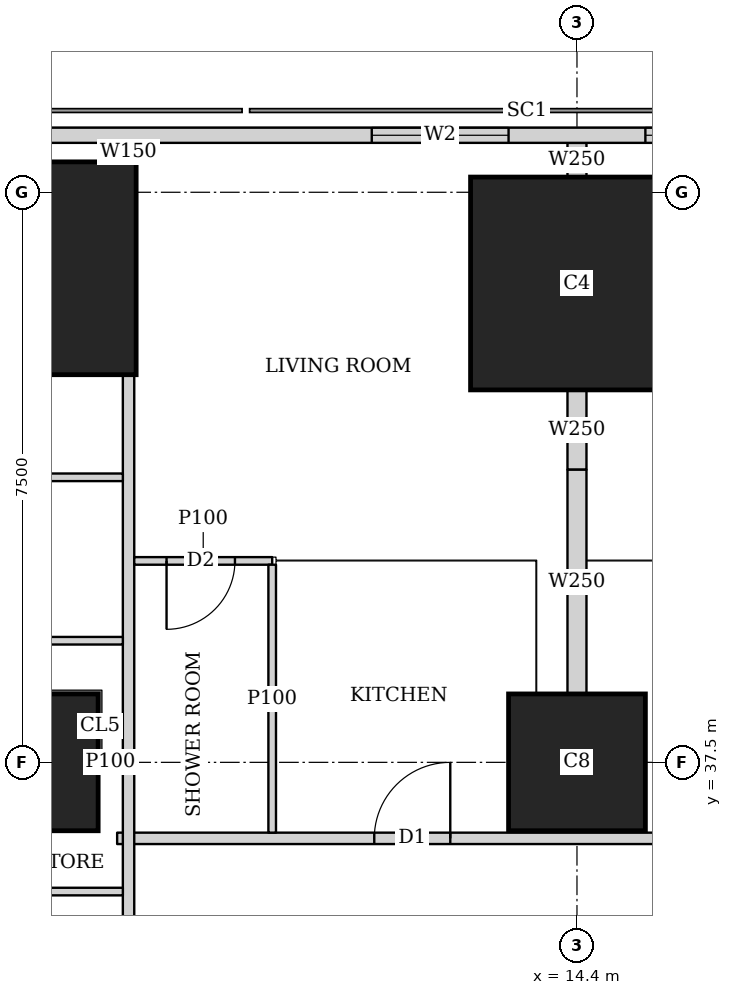
"""IFC4 building model, lengths in metres.
Left out: names, types, materials, properties, quantities, classifications, styles, units other than length and angle.
Written with IfcOpenShell. Run it as: python <this file> out.ifc"""

import sys

from ifc_helpers import new_model, si_unit, direction, frame, frame_2d, origin, origin_2d, place, context, subcontext, project, spatial, rectangle, extrude, element, fill, save


model = new_model("IFC4")
c1 = context("Model", 3, precision=1e-05, world=origin(), true_north=direction((0.0, 1.0)))
c2 = subcontext(c1, "Body", "Model", "MODEL_VIEW")
j1 = project(units=[si_unit("LENGTHUNIT", "METRE"), si_unit("PLANEANGLEUNIT", "RADIAN")], contexts=[c1])
p1 = place(None, origin())
s1 = spatial("IfcSite", under=j1, at=p1, CompositionType="ELEMENT")
p2 = place(p1, origin())
s2 = spatial("IfcBuilding", under=s1, at=p2, CompositionType="ELEMENT")
p3 = place(p2, frame((0.0, 0.0, 42.5)))
s3 = spatial("IfcBuildingStorey", under=s2, at=p3, CompositionType="ELEMENT", Elevation=42.5)
for number, where, z_axis, x_axis in (
    (1, (7.2, 37.5, 0.0), (0.0, 0.0, 1.0), (1.0, 0.0, 0.0)),
    (2, (14.4, 37.5, 0.0), (0.0, 0.0, 1.0), (1.0, 0.0, 0.0)),
):
    element("IfcColumn", number, at=place(p3, frame(where, z_axis=z_axis, x_axis=x_axis)), inside=s3, PredefinedType="COLUMN", context=c2, shape_type="SweptSolid", body=[
        extrude(rectangle(XDim=1.8, YDim=1.8, at=origin_2d()), origin(), (0.0, 0.0, 1.0), 3.75),
    ])
for number, where, z_axis, x_axis in (
    (3, (7.2, 44.0, 0.0), (0.0, 0.0, 1.0), (1.0, 0.0, 0.0)),
    (4, (14.4, 43.8, 0.0), (0.0, 0.0, 1.0), (1.0, 0.0, 0.0)),
):
    element("IfcColumn", number, at=place(p3, frame(where, z_axis=z_axis, x_axis=x_axis)), inside=s3, PredefinedType="COLUMN", context=c2, shape_type="SweptSolid", body=[
        extrude(rectangle(XDim=2.8, YDim=2.8, at=origin_2d()), origin(), (0.0, 0.0, 1.0), 3.75),
    ])
p4 = place(p3, frame((40.106, 45.75, 0.0), z_axis=(0.0, 0.0, 1.0), x_axis=(-1.0, 0.0, 0.0)))
e5 = element("IfcWall", 5, at=p4, inside=s3, PredefinedType="SOLIDWALL", context=c2, shape_type="SweptSolid", body=[
    extrude(rectangle(XDim=37.943, YDim=0.2, at=frame_2d((18.971, 0.0))), origin(), (0.0, 0.0, 1.0), 3.5),
])
p5 = place(p4, frame((8.606, 0.0, 0.9)))
e6 = element("IfcOpeningElement", 6, at=p5, cuts=e5, PredefinedType="OPENING", context=c2, shape_type="SweptSolid", body=[
    extrude(rectangle(XDim=1.8, YDim=1.5, at=frame_2d((0.9, 0.75))), frame((0.0, 0.11, 0.0), z_axis=(0.0, -1.0, 0.0), x_axis=(1.0, 0.0, 0.0)), (0.0, 0.0, 1.0), 0.22),
])
p6 = place(p4, frame((12.206, 0.0, 0.9)))
e7 = element("IfcOpeningElement", 7, at=p6, cuts=e5, PredefinedType="OPENING", context=c2, shape_type="SweptSolid", body=[
    extrude(rectangle(XDim=1.8, YDim=1.5, at=frame_2d((0.9, 0.75))), frame((0.0, 0.11, 0.0), z_axis=(0.0, -1.0, 0.0), x_axis=(1.0, 0.0, 0.0)), (0.0, 0.0, 1.0), 0.22),
])
p7 = place(p4, frame((15.806, 0.0, 0.9)))
e8 = element("IfcOpeningElement", 8, at=p7, cuts=e5, PredefinedType="OPENING", context=c2, shape_type="SweptSolid", body=[
    extrude(rectangle(XDim=1.8, YDim=1.5, at=frame_2d((0.9, 0.75))), frame((0.0, 0.11, 0.0), z_axis=(0.0, -1.0, 0.0), x_axis=(1.0, 0.0, 0.0)), (0.0, 0.0, 1.0), 0.22),
])
p8 = place(p4, frame((19.406, 0.0, 0.9)))
e9 = element("IfcOpeningElement", 9, at=p8, cuts=e5, PredefinedType="OPENING", context=c2, shape_type="SweptSolid", body=[
    extrude(rectangle(XDim=1.8, YDim=1.5, at=frame_2d((0.9, 0.75))), frame((0.0, 0.11, 0.0), z_axis=(0.0, -1.0, 0.0), x_axis=(1.0, 0.0, 0.0)), (0.0, 0.0, 1.0), 0.22),
])
p9 = place(p4, frame((23.006, 0.0, 0.9)))
e10 = element("IfcOpeningElement", 10, at=p9, cuts=e5, PredefinedType="OPENING", context=c2, shape_type="SweptSolid", body=[
    extrude(rectangle(XDim=1.8, YDim=1.5, at=frame_2d((0.9, 0.75))), frame((0.0, 0.11, 0.0), z_axis=(0.0, -1.0, 0.0), x_axis=(1.0, 0.0, 0.0)), (0.0, 0.0, 1.0), 0.22),
])
p10 = place(p4, frame((26.606, 0.0, 0.9)))
e11 = element("IfcOpeningElement", 11, at=p10, cuts=e5, PredefinedType="OPENING", context=c2, shape_type="SweptSolid", body=[
    extrude(rectangle(XDim=1.8, YDim=1.5, at=frame_2d((0.9, 0.75))), frame((0.0, 0.11, 0.0), z_axis=(0.0, -1.0, 0.0), x_axis=(1.0, 0.0, 0.0)), (0.0, 0.0, 1.0), 0.22),
])
p11 = place(p3, frame((8.5, 2.426, 0.0), z_axis=(0.0, 0.0, 1.0), x_axis=(0.0, 1.0, 0.0)))
e12 = element("IfcWall", 12, at=p11, inside=s3, PredefinedType="SOLIDWALL", context=c2, shape_type="SweptSolid", body=[
    extrude(rectangle(XDim=40.173, YDim=0.15, at=frame_2d((20.086, 0.0))), origin(), (0.0, 0.0, 1.0), 3.5),
])
p12 = place(p11, frame((9.986, 0.0, 0.0)))
e13 = element("IfcOpeningElement", 13, at=p12, cuts=e12, PredefinedType="OPENING", context=c2, shape_type="SweptSolid", body=[
    extrude(rectangle(XDim=1.0, YDim=2.1, at=frame_2d((0.5, 1.05))), frame((0.0, 0.085, 0.0), z_axis=(0.0, -1.0, 0.0), x_axis=(1.0, 0.0, 0.0)), (0.0, 0.0, 1.0), 0.17),
])
p13 = place(p11, frame((14.161, 0.0, 0.0)))
e14 = element("IfcOpeningElement", 14, at=p13, cuts=e12, PredefinedType="OPENING", context=c2, shape_type="SweptSolid", body=[
    extrude(rectangle(XDim=1.0, YDim=2.1, at=frame_2d((0.5, 1.05))), frame((0.0, 0.085, 0.0), z_axis=(0.0, -1.0, 0.0), x_axis=(1.0, 0.0, 0.0)), (0.0, 0.0, 1.0), 0.17),
])
p14 = place(p11, frame((21.662, 0.0, 0.0)))
e15 = element("IfcOpeningElement", 15, at=p14, cuts=e12, PredefinedType="OPENING", context=c2, shape_type="SweptSolid", body=[
    extrude(rectangle(XDim=1.0, YDim=2.1, at=frame_2d((0.5, 1.05))), frame((0.0, 0.085, 0.0), z_axis=(0.0, -1.0, 0.0), x_axis=(1.0, 0.0, 0.0)), (0.0, 0.0, 1.0), 0.17),
])
p15 = place(p11, frame((29.161, 0.0, 0.0)))
e16 = element("IfcOpeningElement", 16, at=p15, cuts=e12, PredefinedType="OPENING", context=c2, shape_type="SweptSolid", body=[
    extrude(rectangle(XDim=1.0, YDim=2.1, at=frame_2d((0.5, 1.05))), frame((0.0, 0.085, 0.0), z_axis=(0.0, -1.0, 0.0), x_axis=(1.0, 0.0, 0.0)), (0.0, 0.0, 1.0), 0.17),
])
p16 = place(p3, frame((8.5, 45.401, 0.0), z_axis=(0.0, 0.0, 1.0), x_axis=(0.0, 1.0, 0.0)))
e17 = element("IfcWall", 17, at=p16, inside=s3, PredefinedType="SOLIDWALL", context=c2, shape_type="SweptSolid", body=[
    extrude(rectangle(XDim=0.249, YDim=0.15, at=frame_2d((0.125, 0.0))), origin(), (0.0, 0.0, 1.0), 3.5),
])
p17 = place(p3, frame((8.35, 36.5, 0.0), z_axis=(0.0, 0.0, 1.0), x_axis=(1.0, 0.0, 0.0)))
e18 = element("IfcWall", 18, at=p17, inside=s3, PredefinedType="SOLIDWALL", context=c2, shape_type="SweptSolid", body=[
    extrude(rectangle(XDim=26.415, YDim=0.15, at=frame_2d((13.208, 0.0))), origin(), (0.0, 0.0, 1.0), 3.5),
])
p18 = place(p17, frame((3.383, 0.0, 0.0)))
e19 = element("IfcOpeningElement", 19, at=p18, cuts=e18, PredefinedType="OPENING", context=c2, shape_type="SweptSolid", body=[
    extrude(rectangle(XDim=1.0, YDim=2.1, at=frame_2d((0.5, 1.05))), frame((0.0, 0.085, 0.0), z_axis=(0.0, -1.0, 0.0), x_axis=(1.0, 0.0, 0.0)), (0.0, 0.0, 1.0), 0.17),
])
p19 = place(p17, frame((7.65, 0.0, 0.0)))
e20 = element("IfcOpeningElement", 20, at=p19, cuts=e18, PredefinedType="OPENING", context=c2, shape_type="SweptSolid", body=[
    extrude(rectangle(XDim=1.0, YDim=2.1, at=frame_2d((0.5, 1.05))), frame((0.0, 0.085, 0.0), z_axis=(0.0, -1.0, 0.0), x_axis=(1.0, 0.0, 0.0)), (0.0, 0.0, 1.0), 0.17),
])
p20 = place(p17, frame((14.85, 0.0, 0.0)))
e21 = element("IfcOpeningElement", 21, at=p20, cuts=e18, PredefinedType="OPENING", context=c2, shape_type="SweptSolid", body=[
    extrude(rectangle(XDim=1.0, YDim=2.1, at=frame_2d((0.5, 1.05))), frame((0.0, 0.085, 0.0), z_axis=(0.0, -1.0, 0.0), x_axis=(1.0, 0.0, 0.0)), (0.0, 0.0, 1.0), 0.17),
])
p21 = place(p17, frame((23.923, 0.0, 0.0)))
e22 = element("IfcOpeningElement", 22, at=p21, cuts=e18, PredefinedType="OPENING", context=c2, shape_type="SweptSolid", body=[
    extrude(rectangle(XDim=1.0, YDim=2.1, at=frame_2d((0.5, 1.05))), frame((0.0, 0.085, 0.0), z_axis=(0.0, -1.0, 0.0), x_axis=(1.0, 0.0, 0.0)), (0.0, 0.0, 1.0), 0.17),
])
p22 = place(p3, frame((8.101, 37.5, 0.0), z_axis=(0.0, 0.0, 1.0), x_axis=(1.0, 0.0, 0.0)))
e23 = element("IfcWall", 23, at=p22, inside=s3, PredefinedType="PARTITIONING", context=c2, shape_type="SweptSolid", body=[
    extrude(rectangle(XDim=0.324, YDim=0.1, at=frame_2d((0.162, 0.0))), origin(), (0.0, 0.0, 1.0), 3.5),
])
for number, where, z_axis, x_axis in (
    (24, (4.9, 41.25, 0.0), (0.0, 0.0, 1.0), (1.0, 0.0, 0.0)),
    (25, (4.9, 35.8, 0.0), (0.0, 0.0, 1.0), (1.0, 0.0, 0.0)),
    (26, (4.9, 39.1, 0.0), (0.0, 0.0, 1.0), (1.0, 0.0, 0.0)),
):
    element("IfcWall", number, at=place(p3, frame(where, z_axis=z_axis, x_axis=x_axis)), inside=s3, PredefinedType="PARTITIONING", context=c2, shape_type="SweptSolid", body=[
        extrude(rectangle(XDim=3.525, YDim=0.1, at=frame_2d((1.763, 0.0))), origin(), (0.0, 0.0, 1.0), 3.5),
    ])
p23 = place(p3, frame((8.575, 40.15, 0.0), z_axis=(0.0, 0.0, 1.0), x_axis=(1.0, 0.0, 0.0)))
e27 = element("IfcWall", 27, at=p23, inside=s3, PredefinedType="PARTITIONING", context=c2, shape_type="SweptSolid", body=[
    extrude(rectangle(XDim=1.815, YDim=0.1, at=frame_2d((0.907, 0.0))), origin(), (0.0, 0.0, 1.0), 3.5),
])
p24 = place(p23, frame((0.425, 0.0, 0.0)))
e28 = element("IfcOpeningElement", 28, at=p24, cuts=e27, PredefinedType="OPENING", context=c2, shape_type="SweptSolid", body=[
    extrude(rectangle(XDim=0.9, YDim=2.1, at=frame_2d((0.45, 1.05))), frame((0.0, 0.06, 0.0), z_axis=(0.0, -1.0, 0.0), x_axis=(1.0, 0.0, 0.0)), (0.0, 0.0, 1.0), 0.12),
])
p25 = place(p3, frame((10.39, 36.575, 0.0), z_axis=(0.0, 0.0, 1.0), x_axis=(0.0, 1.0, 0.0)))
e29 = element("IfcWall", 29, at=p25, inside=s3, PredefinedType="PARTITIONING", context=c2, shape_type="SweptSolid", body=[
    extrude(rectangle(XDim=3.525, YDim=0.1, at=frame_2d((1.763, 0.0))), origin(), (0.0, 0.0, 1.0), 3.5),
])
p26 = place(p3, frame((14.4, 41.35, 0.0), z_axis=(0.0, 0.0, 1.0), x_axis=(0.0, 1.0, 0.0)))
e30 = element("IfcWall", 30, at=p26, inside=s3, PredefinedType="SOLIDWALL", context=c2, shape_type="SweptSolid", body=[
    extrude(rectangle(XDim=1.049, YDim=0.25, at=frame_2d((0.524, 0.0))), origin(), (0.0, 0.0, 1.0), 3.5),
])
p27 = place(p3, frame((14.4, 45.201, 0.0), z_axis=(0.0, 0.0, 1.0), x_axis=(0.0, 1.0, 0.0)))
e31 = element("IfcWall", 31, at=p27, inside=s3, PredefinedType="SOLIDWALL", context=c2, shape_type="SweptSolid", body=[
    extrude(rectangle(XDim=0.449, YDim=0.25, at=frame_2d((0.225, 0.0))), origin(), (0.0, 0.0, 1.0), 3.5),
])
p28 = place(p3, frame((14.4, 38.401, 0.0), z_axis=(0.0, 0.0, 1.0), x_axis=(0.0, 1.0, 0.0)))
e32 = element("IfcWall", 32, at=p28, inside=s3, PredefinedType="SOLIDWALL", context=c2, shape_type="SweptSolid", body=[
    extrude(rectangle(XDim=2.949, YDim=0.25, at=frame_2d((1.475, 0.0))), origin(), (0.0, 0.0, 1.0), 3.5),
])
p29 = place(p9, origin())
e33 = element("IfcWindow", 33, at=p29, inside=s3, PartitioningType="SINGLE_PANEL", PredefinedType="WINDOW", context=c2, shape_type="SweptSolid", body=[
    extrude(rectangle(XDim=1.8, YDim=1.5, at=frame_2d((0.9, 0.75))), frame((0.0, 0.03, 0.0), z_axis=(0.0, -1.0, 0.0), x_axis=(1.0, 0.0, 0.0)), (0.0, 0.0, 1.0), 0.06),
])
fill(e10, e33)
p30 = place(p10, origin())
e34 = element("IfcWindow", 34, at=p30, inside=s3, PartitioningType="SINGLE_PANEL", PredefinedType="WINDOW", context=c2, shape_type="SweptSolid", body=[
    extrude(rectangle(XDim=1.8, YDim=1.5, at=frame_2d((0.9, 0.75))), frame((0.0, 0.03, 0.0), z_axis=(0.0, -1.0, 0.0), x_axis=(1.0, 0.0, 0.0)), (0.0, 0.0, 1.0), 0.06),
])
fill(e11, e34)
p31 = place(p24, origin())
e35 = element("IfcDoor", 35, at=p31, inside=s3, OperationType="SINGLE_SWING_RIGHT", PredefinedType="DOOR", context=c2, shape_type="SweptSolid", body=[
    extrude(rectangle(XDim=0.9, YDim=2.1, at=frame_2d((0.45, 1.05))), frame((0.0, 0.025, 0.0), z_axis=(0.0, -1.0, 0.0), x_axis=(1.0, 0.0, 0.0)), (0.0, 0.0, 1.0), 0.05),
])
fill(e28, e35)
p32 = place(p18, origin())
e36 = element("IfcDoor", 36, at=p32, inside=s3, OperationType="SINGLE_SWING_RIGHT", PredefinedType="DOOR", context=c2, shape_type="SweptSolid", body=[
    extrude(rectangle(XDim=1.0, YDim=2.1, at=frame_2d((0.5, 1.05))), frame((0.0, 0.025, 0.0), z_axis=(0.0, -1.0, 0.0), x_axis=(1.0, 0.0, 0.0)), (0.0, 0.0, 1.0), 0.05),
])
fill(e19, e36)
save(model, sys.argv[1])
